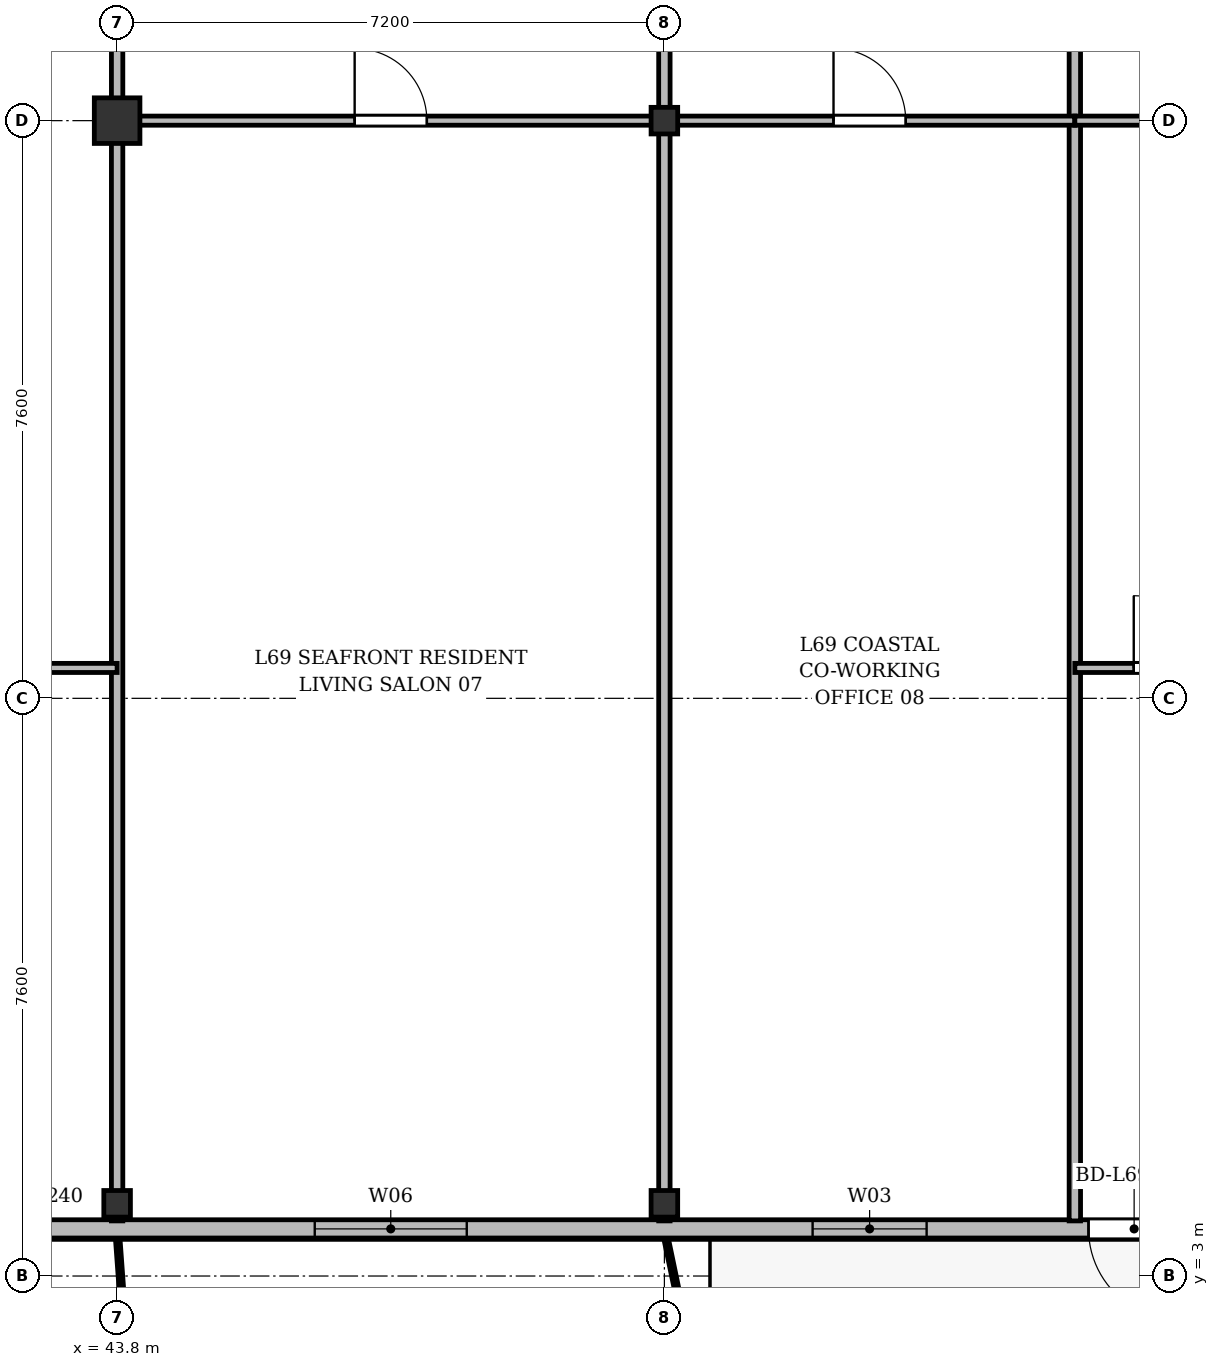
"""IFC4 building model, lengths in metres.
Left out: names, types, materials, properties, quantities, classifications, styles, units other than length and angle.
Written with IfcOpenShell. Run it as: python <this file> out.ifc"""

import sys

from ifc_helpers import new_model, si_unit, direction, frame, frame_2d, origin, origin_2d, place, context, subcontext, project, spatial, rectangle, i_section, extrude, source, transform, mapped, element, fill, save


model = new_model("IFC4")
c1 = context("Model", 3, precision=1e-05, world=origin(), true_north=direction((0.0, 1.0)))
c2 = subcontext(c1, "Body", "Model", "MODEL_VIEW")
j1 = project(units=[si_unit("LENGTHUNIT", "METRE"), si_unit("PLANEANGLEUNIT", "RADIAN")], contexts=[c1])
p1 = place(None, origin())
s1 = spatial("IfcSite", under=j1, at=p1, CompositionType="ELEMENT")
p2 = place(p1, origin())
s2 = spatial("IfcBuilding", under=s1, at=p2, CompositionType="ELEMENT")
p3 = place(p2, frame((0.0, 0.0, 266.7)))
s3 = spatial("IfcBuildingStorey", under=s2, at=p3, CompositionType="ELEMENT", Elevation=266.7)
m1 = source(origin(), c2, "Body", "SweptSolid", [
    extrude(i_section(OverallWidth=0.35, OverallDepth=0.35, WebThickness=0.018, FlangeThickness=0.028, at=origin_2d()), origin(), (0.0, 0.0, 1.0), 3.6),
])
p4 = place(p3, frame((43.8, 3.95, 0.0), z_axis=(0.0, 0.0, 1.0), x_axis=(1.0, 0.0, 0.0)))
e1 = element("IfcColumn", 1, at=p4, inside=s3, PredefinedType="COLUMN", context=c2, shape_type="MappedRepresentation", body=[
    mapped(m1, transform((0.0, 0.0, 0.0), x_axis=(1.0, 0.0, 0.0), y_axis=(0.0, 1.0, 0.0), z_axis=(0.0, 0.0, 1.0), scale=1.0)),
])
m2 = source(origin(), c2, "Body", "SweptSolid", [
    extrude(rectangle(XDim=0.6, YDim=0.6, at=origin_2d()), origin(), (0.0, 0.0, 1.0), 3.6),
])
p5 = place(p3, frame((43.8, 18.2, 0.0), z_axis=(0.0, 0.0, 1.0), x_axis=(1.0, 0.0, 0.0)))
e2 = element("IfcColumn", 2, at=p5, inside=s3, PredefinedType="COLUMN", context=c2, shape_type="MappedRepresentation", body=[
    mapped(m2, transform((0.0, 0.0, 0.0), x_axis=(1.0, 0.0, 0.0), y_axis=(0.0, 1.0, 0.0), z_axis=(0.0, 0.0, 1.0), scale=1.0)),
])
for number, where, z_axis, x_axis in (
    (3, (51.0, 3.95, 0.0), (0.0, 0.0, 1.0), (1.0, 0.0, 0.0)),
    (4, (51.0, 18.2, 0.0), (0.0, 0.0, 1.0), (1.0, 0.0, 0.0)),
):
    element("IfcColumn", number, at=place(p3, frame(where, z_axis=z_axis, x_axis=x_axis)), inside=s3, PredefinedType="COLUMN", context=c2, shape_type="MappedRepresentation", body=[
        mapped(m1, transform((0.0, 0.0, 0.0), x_axis=(1.0, 0.0, 0.0), y_axis=(0.0, 1.0, 0.0), z_axis=(0.0, 0.0, 1.0), scale=1.0)),
    ])
p6 = place(p3, frame((63.2, 3.62, 0.0), z_axis=(0.0, 0.0, 1.0), x_axis=(-1.0, 0.0, 0.0)))
e5 = element("IfcWall", 5, at=p6, inside=s3, PredefinedType="SOLIDWALL", context=c2, shape_type="SweptSolid", body=[
    extrude(rectangle(XDim=52.0, YDim=0.24, at=frame_2d((26.0, 0.0))), origin(), (0.0, 0.0, 1.0), 3.37),
])
p7 = place(p6, frame((0.345, 0.0, 0.9)))
e6 = element("IfcOpeningElement", 6, at=p7, cuts=e5, PredefinedType="OPENING", context=c2, shape_type="SweptSolid", body=[
    extrude(rectangle(XDim=1.2, YDim=1.65, at=frame_2d((0.6, 0.825))), frame((0.0, 0.13, 0.0), z_axis=(0.0, -1.0, 0.0), x_axis=(1.0, 0.0, 0.0)), (0.0, 0.0, 1.0), 0.26),
])
p8 = place(p6, frame((2.15, 0.0, 0.9)))
e7 = element("IfcOpeningElement", 7, at=p8, cuts=e5, PredefinedType="OPENING", context=c2, shape_type="SweptSolid", body=[
    extrude(rectangle(XDim=1.8, YDim=1.8, at=frame_2d((0.9, 0.9))), frame((0.0, 0.13, 0.0), z_axis=(0.0, -1.0, 0.0), x_axis=(1.0, 0.0, 0.0)), (0.0, 0.0, 1.0), 0.26),
])
p9 = place(p6, frame((5.42, 0.0, 0.0)))
e8 = element("IfcOpeningElement", 8, at=p9, cuts=e5, PredefinedType="OPENING", context=c2, shape_type="SweptSolid", body=[
    extrude(rectangle(XDim=1.2, YDim=2.2, at=frame_2d((0.6, 1.1))), frame((0.0, 0.13, 0.0), z_axis=(0.0, -1.0, 0.0), x_axis=(1.0, 0.0, 0.0)), (0.0, 0.0, 1.0), 0.26),
])
p10 = place(p6, frame((8.75, 0.0, 0.9)))
e9 = element("IfcOpeningElement", 9, at=p10, cuts=e5, PredefinedType="OPENING", context=c2, shape_type="SweptSolid", body=[
    extrude(rectangle(XDim=1.5, YDim=1.75, at=frame_2d((0.75, 0.875))), frame((0.0, 0.13, 0.0), z_axis=(0.0, -1.0, 0.0), x_axis=(1.0, 0.0, 0.0)), (0.0, 0.0, 1.0), 0.26),
])
p11 = place(p6, frame((14.8, 0.0, 0.9)))
e10 = element("IfcOpeningElement", 10, at=p11, cuts=e5, PredefinedType="OPENING", context=c2, shape_type="SweptSolid", body=[
    extrude(rectangle(XDim=2.0, YDim=1.95, at=frame_2d((1.0, 0.975))), frame((0.0, 0.13, 0.0), z_axis=(0.0, -1.0, 0.0), x_axis=(1.0, 0.0, 0.0)), (0.0, 0.0, 1.0), 0.26),
])
p12 = place(p6, frame((20.425, 0.0, 0.9)))
e11 = element("IfcOpeningElement", 11, at=p12, cuts=e5, PredefinedType="OPENING", context=c2, shape_type="SweptSolid", body=[
    extrude(rectangle(XDim=1.65, YDim=1.85, at=frame_2d((0.825, 0.925))), frame((0.0, 0.13, 0.0), z_axis=(0.0, -1.0, 0.0), x_axis=(1.0, 0.0, 0.0)), (0.0, 0.0, 1.0), 0.26),
])
p13 = place(p6, frame((24.05, 0.0, 0.9)))
e12 = element("IfcOpeningElement", 12, at=p13, cuts=e5, PredefinedType="OPENING", context=c2, shape_type="SweptSolid", body=[
    extrude(rectangle(XDim=1.8, YDim=1.8, at=frame_2d((0.9, 0.9))), frame((0.0, 0.13, 0.0), z_axis=(0.0, -1.0, 0.0), x_axis=(1.0, 0.0, 0.0)), (0.0, 0.0, 1.0), 0.26),
])
p14 = place(p6, frame((28.6, 0.0, 0.9)))
e13 = element("IfcOpeningElement", 13, at=p14, cuts=e5, PredefinedType="OPENING", context=c2, shape_type="SweptSolid", body=[
    extrude(rectangle(XDim=2.2, YDim=1.8, at=frame_2d((1.1, 0.9))), frame((0.0, 0.13, 0.0), z_axis=(0.0, -1.0, 0.0), x_axis=(1.0, 0.0, 0.0)), (0.0, 0.0, 1.0), 0.26),
])
p15 = place(p6, frame((34.078, 0.0, 0.0)))
e14 = element("IfcOpeningElement", 14, at=p15, cuts=e5, PredefinedType="OPENING", context=c2, shape_type="SweptSolid", body=[
    extrude(rectangle(XDim=1.2, YDim=2.2, at=frame_2d((0.6, 1.1))), frame((0.0, 0.13, 0.0), z_axis=(0.0, -1.0, 0.0), x_axis=(1.0, 0.0, 0.0)), (0.0, 0.0, 1.0), 0.26),
])
p16 = place(p6, frame((37.0, 0.0, 0.9)))
e15 = element("IfcOpeningElement", 15, at=p16, cuts=e5, PredefinedType="OPENING", context=c2, shape_type="SweptSolid", body=[
    extrude(rectangle(XDim=2.0, YDim=1.95, at=frame_2d((1.0, 0.975))), frame((0.0, 0.13, 0.0), z_axis=(0.0, -1.0, 0.0), x_axis=(1.0, 0.0, 0.0)), (0.0, 0.0, 1.0), 0.26),
])
p17 = place(p6, frame((41.075, 0.0, 0.9)))
e16 = element("IfcOpeningElement", 16, at=p17, cuts=e5, PredefinedType="OPENING", context=c2, shape_type="SweptSolid", body=[
    extrude(rectangle(XDim=1.65, YDim=1.85, at=frame_2d((0.825, 0.925))), frame((0.0, 0.13, 0.0), z_axis=(0.0, -1.0, 0.0), x_axis=(1.0, 0.0, 0.0)), (0.0, 0.0, 1.0), 0.26),
])
p18 = place(p6, frame((44.19, 0.0, 0.9)))
e17 = element("IfcOpeningElement", 17, at=p18, cuts=e5, PredefinedType="OPENING", context=c2, shape_type="SweptSolid", body=[
    extrude(rectangle(XDim=1.8, YDim=1.8, at=frame_2d((0.9, 0.9))), frame((0.0, 0.13, 0.0), z_axis=(0.0, -1.0, 0.0), x_axis=(1.0, 0.0, 0.0)), (0.0, 0.0, 1.0), 0.26),
])
p19 = place(p6, frame((50.005, 0.0, 0.9)))
e18 = element("IfcOpeningElement", 18, at=p19, cuts=e5, PredefinedType="OPENING", context=c2, shape_type="SweptSolid", body=[
    extrude(rectangle(XDim=1.5, YDim=1.75, at=frame_2d((0.75, 0.875))), frame((0.0, 0.13, 0.0), z_axis=(0.0, -1.0, 0.0), x_axis=(1.0, 0.0, 0.0)), (0.0, 0.0, 1.0), 0.26),
])
for number, where, z_axis, x_axis in (
    (19, (43.8, 3.725, 0.0), (0.0, 0.0, 1.0), (0.0, 1.0, 0.0)),
    (20, (51.0, 3.725, 0.0), (0.0, 0.0, 1.0), (0.0, 1.0, 0.0)),
):
    element("IfcWall", number, at=place(p3, frame(where, z_axis=z_axis, x_axis=x_axis)), inside=s3, PredefinedType="PARTITIONING", context=c2, shape_type="SweptSolid", body=[
        extrude(rectangle(XDim=27.275, YDim=0.15, at=frame_2d((13.637, 0.0))), origin(), (0.0, 0.0, 1.0), 2.87),
    ])
p20 = place(p3, frame((56.4, 3.725, 0.0), z_axis=(0.0, 0.0, 1.0), x_axis=(0.0, 1.0, 0.0)))
e21 = element("IfcWall", 21, at=p20, inside=s3, PredefinedType="PARTITIONING", context=c2, shape_type="SweptSolid", body=[
    extrude(rectangle(XDim=27.275, YDim=0.15, at=frame_2d((13.637, 0.0))), origin(), (0.0, 0.0, 1.0), 2.92),
])
p21 = place(p3, frame((40.1, 11.0, 0.0), z_axis=(0.0, 0.0, 1.0), x_axis=(1.0, 0.0, 0.0)))
e22 = element("IfcWall", 22, at=p21, inside=s3, PredefinedType="PARTITIONING", context=c2, shape_type="SweptSolid", body=[
    extrude(rectangle(XDim=3.7, YDim=0.12, at=frame_2d((1.85, 0.0))), origin(), (0.0, 0.0, 1.0), 2.87),
])
p22 = place(p21, frame((1.285, 0.0, 0.0)))
e23 = element("IfcOpeningElement", 23, at=p22, cuts=e22, PredefinedType="OPENING", context=c2, shape_type="SweptSolid", body=[
    extrude(rectangle(XDim=0.95, YDim=2.15, at=frame_2d((0.475, 1.075))), frame((0.0, 0.07, 0.0), z_axis=(0.0, -1.0, 0.0), x_axis=(1.0, 0.0, 0.0)), (0.0, 0.0, 1.0), 0.14),
])
p23 = place(p3, frame((43.8, 18.2, 0.0), z_axis=(0.0, 0.0, 1.0), x_axis=(1.0, 0.0, 0.0)))
e24 = element("IfcWall", 24, at=p23, inside=s3, PredefinedType="PARTITIONING", context=c2, shape_type="SweptSolid", body=[
    extrude(rectangle(XDim=7.2, YDim=0.12, at=frame_2d((3.6, 0.0))), origin(), (0.0, 0.0, 1.0), 2.92),
])
p24 = place(p23, frame((3.125, 0.0, 0.0)))
e25 = element("IfcOpeningElement", 25, at=p24, cuts=e24, PredefinedType="OPENING", context=c2, shape_type="SweptSolid", body=[
    extrude(rectangle(XDim=0.95, YDim=2.15, at=frame_2d((0.475, 1.075))), frame((0.0, 0.07, 0.0), z_axis=(0.0, -1.0, 0.0), x_axis=(1.0, 0.0, 0.0)), (0.0, 0.0, 1.0), 0.14),
])
p25 = place(p3, frame((51.0, 18.2, 0.0), z_axis=(0.0, 0.0, 1.0), x_axis=(1.0, 0.0, 0.0)))
e26 = element("IfcWall", 26, at=p25, inside=s3, PredefinedType="PARTITIONING", context=c2, shape_type="SweptSolid", body=[
    extrude(rectangle(XDim=5.4, YDim=0.12, at=frame_2d((2.7, 0.0))), origin(), (0.0, 0.0, 1.0), 2.92),
])
p26 = place(p25, frame((2.225, 0.0, 0.0)))
e27 = element("IfcOpeningElement", 27, at=p26, cuts=e26, PredefinedType="OPENING", context=c2, shape_type="SweptSolid", body=[
    extrude(rectangle(XDim=0.95, YDim=2.15, at=frame_2d((0.475, 1.075))), frame((0.0, 0.07, 0.0), z_axis=(0.0, -1.0, 0.0), x_axis=(1.0, 0.0, 0.0)), (0.0, 0.0, 1.0), 0.14),
])
p27 = place(p3, frame((56.4, 18.2, 0.0), z_axis=(0.0, 0.0, 1.0), x_axis=(1.0, 0.0, 0.0)))
e28 = element("IfcWall", 28, at=p27, inside=s3, PredefinedType="PARTITIONING", context=c2, shape_type="SweptSolid", body=[
    extrude(rectangle(XDim=5.0, YDim=0.12, at=frame_2d((2.5, 0.0))), origin(), (0.0, 0.0, 1.0), 2.92),
])
p28 = place(p27, frame((3.487, 0.0, 0.0)))
e29 = element("IfcOpeningElement", 29, at=p28, cuts=e28, PredefinedType="OPENING", context=c2, shape_type="SweptSolid", body=[
    extrude(rectangle(XDim=0.95, YDim=2.15, at=frame_2d((0.475, 1.075))), frame((0.0, 0.07, 0.0), z_axis=(0.0, -1.0, 0.0), x_axis=(1.0, 0.0, 0.0)), (0.0, 0.0, 1.0), 0.14),
])
p29 = place(p3, frame((56.4, 11.0, 0.0), z_axis=(0.0, 0.0, 1.0), x_axis=(1.0, 0.0, 0.0)))
e30 = element("IfcWall", 30, at=p29, inside=s3, PredefinedType="PARTITIONING", context=c2, shape_type="SweptSolid", body=[
    extrude(rectangle(XDim=2.5, YDim=0.12, at=frame_2d((1.25, 0.0))), origin(), (0.0, 0.0, 1.0), 2.87),
])
p30 = place(p29, frame((0.775, 0.0, 0.0)))
e31 = element("IfcOpeningElement", 31, at=p30, cuts=e30, PredefinedType="OPENING", context=c2, shape_type="SweptSolid", body=[
    extrude(rectangle(XDim=0.95, YDim=2.15, at=frame_2d((0.475, 1.075))), frame((0.0, 0.07, 0.0), z_axis=(0.0, -1.0, 0.0), x_axis=(1.0, 0.0, 0.0)), (0.0, 0.0, 1.0), 0.14),
])
m3 = source(origin(), c2, "Body", "SweptSolid", [
    extrude(rectangle(XDim=1.2, YDim=2.2, at=frame_2d((0.6, 1.1))), frame((0.0, 0.025, 0.0), z_axis=(0.0, -1.0, 0.0), x_axis=(1.0, 0.0, 0.0)), (0.0, 0.0, 1.0), 0.05),
])
p31 = place(p9, origin())
e32 = element("IfcDoor", 32, at=p31, inside=s3, OperationType="SINGLE_SWING_LEFT", PredefinedType="DOOR", context=c2, shape_type="MappedRepresentation", body=[
    mapped(m3, transform((0.0, 0.0, 0.0), x_axis=(1.0, 0.0, 0.0), y_axis=(0.0, 1.0, 0.0), z_axis=(0.0, 0.0, 1.0), scale=1.0)),
])
fill(e8, e32)
m4 = source(origin(), c2, "Body", "SweptSolid", [
    extrude(rectangle(XDim=1.5, YDim=1.75, at=frame_2d((0.75, 0.875))), frame((0.0, 0.03, 0.0), z_axis=(0.0, -1.0, 0.0), x_axis=(1.0, 0.0, 0.0)), (0.0, 0.0, 1.0), 0.06),
])
p32 = place(p10, origin())
e33 = element("IfcWindow", 33, at=p32, inside=s3, PartitioningType="SINGLE_PANEL", PredefinedType="WINDOW", context=c2, shape_type="MappedRepresentation", body=[
    mapped(m4, transform((0.0, 0.0, 0.0), x_axis=(1.0, 0.0, 0.0), y_axis=(0.0, 1.0, 0.0), z_axis=(0.0, 0.0, 1.0), scale=1.0)),
])
fill(e9, e33)
m5 = source(origin(), c2, "Body", "SweptSolid", [
    extrude(rectangle(XDim=2.0, YDim=1.95, at=frame_2d((1.0, 0.975))), frame((0.0, 0.03, 0.0), z_axis=(0.0, -1.0, 0.0), x_axis=(1.0, 0.0, 0.0)), (0.0, 0.0, 1.0), 0.06),
])
p33 = place(p11, origin())
e34 = element("IfcWindow", 34, at=p33, inside=s3, PartitioningType="SINGLE_PANEL", PredefinedType="WINDOW", context=c2, shape_type="MappedRepresentation", body=[
    mapped(m5, transform((0.0, 0.0, 0.0), x_axis=(1.0, 0.0, 0.0), y_axis=(0.0, 1.0, 0.0), z_axis=(0.0, 0.0, 1.0), scale=1.0)),
])
fill(e10, e34)
m6 = source(origin(), c2, "Body", "SweptSolid", [
    extrude(rectangle(XDim=0.95, YDim=2.15, at=frame_2d((0.475, 1.075))), frame((0.0, 0.025, 0.0), z_axis=(0.0, -1.0, 0.0), x_axis=(1.0, 0.0, 0.0)), (0.0, 0.0, 1.0), 0.05),
])
p34 = place(p24, origin())
e35 = element("IfcDoor", 35, at=p34, inside=s3, OperationType="SINGLE_SWING_LEFT", PredefinedType="DOOR", context=c2, shape_type="MappedRepresentation", body=[
    mapped(m6, transform((0.0, 0.0, 0.0), x_axis=(1.0, 0.0, 0.0), y_axis=(0.0, 1.0, 0.0), z_axis=(0.0, 0.0, 1.0), scale=1.0)),
])
fill(e25, e35)
p35 = place(p26, origin())
e36 = element("IfcDoor", 36, at=p35, inside=s3, OperationType="SINGLE_SWING_LEFT", PredefinedType="DOOR", context=c2, shape_type="MappedRepresentation", body=[
    mapped(m6, transform((0.0, 0.0, 0.0), x_axis=(1.0, 0.0, 0.0), y_axis=(0.0, 1.0, 0.0), z_axis=(0.0, 0.0, 1.0), scale=1.0)),
])
fill(e27, e36)
p36 = place(p30, origin())
e37 = element("IfcDoor", 37, at=p36, inside=s3, OperationType="SINGLE_SWING_LEFT", PredefinedType="DOOR", context=c2, shape_type="MappedRepresentation", body=[
    mapped(m6, transform((0.0, 0.0, 0.0), x_axis=(1.0, 0.0, 0.0), y_axis=(0.0, 1.0, 0.0), z_axis=(0.0, 0.0, 1.0), scale=1.0)),
])
fill(e31, e37)
save(model, sys.argv[1])
